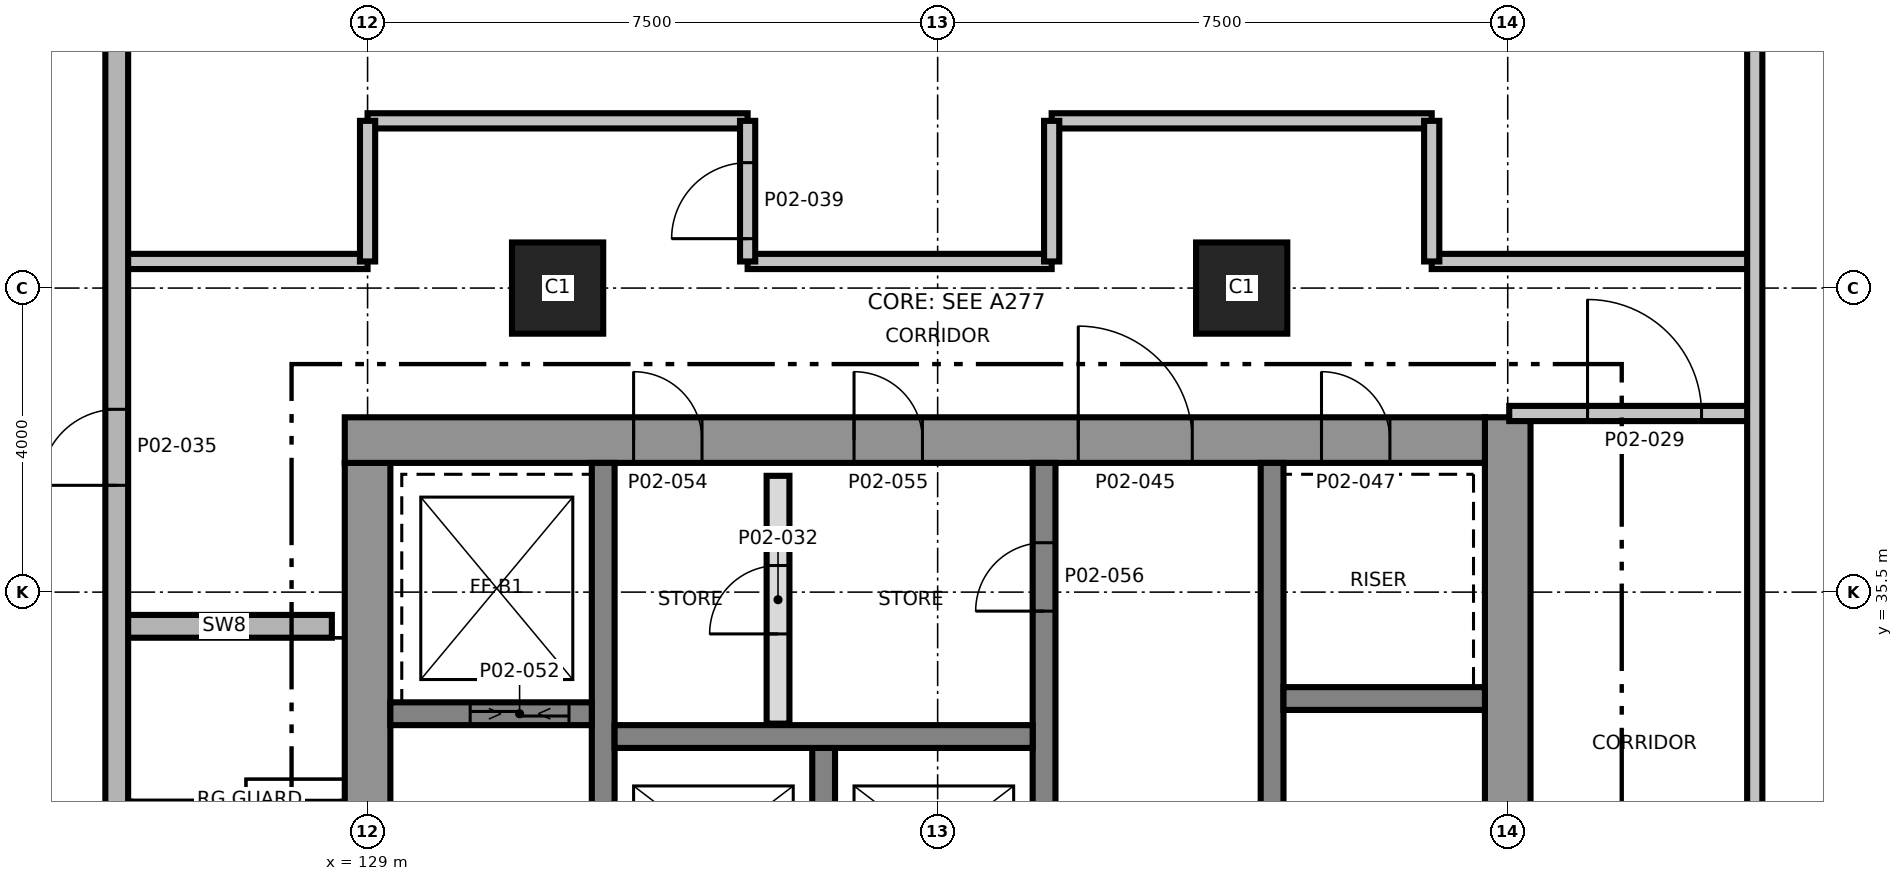
"""IFC4 building model, lengths in metres.
Left out: names, types, materials, properties, quantities, classifications, styles, units other than length and angle.
Written with IfcOpenShell. Run it as: python <this file> out.ifc"""

import sys

from ifc_helpers import new_model, si_unit, direction, frame, frame_2d, origin, origin_2d, place, context, subcontext, project, spatial, rectangle, extrude, element, fill, save


model = new_model("IFC4")
c1 = context("Model", 3, precision=1e-05, world=origin(), true_north=direction((0.0, 1.0)))
c2 = subcontext(c1, "Body", "Model", "MODEL_VIEW")
j1 = project(units=[si_unit("LENGTHUNIT", "METRE"), si_unit("PLANEANGLEUNIT", "RADIAN")], contexts=[c1])
p1 = place(None, origin())
s1 = spatial("IfcSite", under=j1, at=p1, CompositionType="ELEMENT")
p2 = place(p1, origin())
s2 = spatial("IfcBuilding", under=s1, at=p2, CompositionType="ELEMENT")
p3 = place(p2, frame((0.0, 0.0, 13.5)))
s3 = spatial("IfcBuildingStorey", under=s2, at=p3, CompositionType="ELEMENT", Elevation=13.5)
p4 = place(p3, frame((129.0, 24.8, 0.0), z_axis=(0.0, 0.0, 1.0), x_axis=(0.0, 1.0, 0.0)))
e1 = element("IfcWall", 1, at=p4, inside=s3, PredefinedType="SHEAR", context=c2, shape_type="SweptSolid", body=[
    extrude(rectangle(XDim=12.4, YDim=0.6, at=frame_2d((6.2, 0.0))), origin(), (0.0, 0.0, 1.0), 5.0),
])
p5 = place(p4, frame((5.15, 0.0, 0.0)))
e2 = element("IfcOpeningElement", 2, at=p5, cuts=e1, PredefinedType="OPENING", context=c2, shape_type="SweptSolid", body=[
    extrude(rectangle(XDim=1.0, YDim=2.1, at=frame_2d((0.5, 1.05))), frame((0.0, 0.31, 0.0), z_axis=(0.0, -1.0, 0.0), x_axis=(1.0, 0.0, 0.0)), (0.0, 0.0, 1.0), 0.62),
])
p6 = place(p3, frame((144.0, 24.2, 0.0), z_axis=(0.0, 0.0, 1.0), x_axis=(0.0, 1.0, 0.0)))
e3 = element("IfcWall", 3, at=p6, inside=s3, PredefinedType="SHEAR", context=c2, shape_type="SweptSolid", body=[
    extrude(rectangle(XDim=13.6, YDim=0.6, at=frame_2d((6.8, 0.0))), origin(), (0.0, 0.0, 1.0), 5.0),
])
p7 = place(p3, frame((128.7, 37.5, 0.0), z_axis=(0.0, 0.0, 1.0), x_axis=(1.0, 0.0, 0.0)))
e4 = element("IfcWall", 4, at=p7, inside=s3, PredefinedType="SHEAR", context=c2, shape_type="SweptSolid", body=[
    extrude(rectangle(XDim=15.0, YDim=0.6, at=frame_2d((7.5, 0.0))), origin(), (0.0, 0.0, 1.0), 5.0),
])
p8 = place(p7, frame((9.65, 0.0, 0.0)))
e5 = element("IfcOpeningElement", 5, at=p8, cuts=e4, PredefinedType="OPENING", context=c2, shape_type="SweptSolid", body=[
    extrude(rectangle(XDim=1.5, YDim=2.1, at=frame_2d((0.75, 1.05))), frame((0.0, 0.31, 0.0), z_axis=(0.0, -1.0, 0.0), x_axis=(1.0, 0.0, 0.0)), (0.0, 0.0, 1.0), 0.62),
])
p9 = place(p7, frame((12.85, 0.0, 0.0)))
e6 = element("IfcOpeningElement", 6, at=p9, cuts=e4, PredefinedType="OPENING", context=c2, shape_type="SweptSolid", body=[
    extrude(rectangle(XDim=0.9, YDim=2.1, at=frame_2d((0.45, 1.05))), frame((0.0, 0.31, 0.0), z_axis=(0.0, -1.0, 0.0), x_axis=(1.0, 0.0, 0.0)), (0.0, 0.0, 1.0), 0.62),
])
p10 = place(p7, frame((3.8, 0.0, 0.0)))
e7 = element("IfcOpeningElement", 7, at=p10, cuts=e4, PredefinedType="OPENING", context=c2, shape_type="SweptSolid", body=[
    extrude(rectangle(XDim=0.9, YDim=2.1, at=frame_2d((0.45, 1.05))), frame((0.0, 0.31, 0.0), z_axis=(0.0, -1.0, 0.0), x_axis=(1.0, 0.0, 0.0)), (0.0, 0.0, 1.0), 0.62),
])
p11 = place(p7, frame((6.7, 0.0, 0.0)))
e8 = element("IfcOpeningElement", 8, at=p11, cuts=e4, PredefinedType="OPENING", context=c2, shape_type="SweptSolid", body=[
    extrude(rectangle(XDim=0.9, YDim=2.1, at=frame_2d((0.45, 1.05))), frame((0.0, 0.31, 0.0), z_axis=(0.0, -1.0, 0.0), x_axis=(1.0, 0.0, 0.0)), (0.0, 0.0, 1.0), 0.62),
])
p12 = place(p3, frame((132.1, 24.8, 0.0), z_axis=(0.0, 0.0, 1.0), x_axis=(0.0, 1.0, 0.0)))
e9 = element("IfcWall", 9, at=p12, inside=s3, PredefinedType="SHEAR", context=c2, shape_type="SweptSolid", body=[
    extrude(rectangle(XDim=12.4, YDim=0.3, at=frame_2d((6.2, 0.0))), origin(), (0.0, 0.0, 1.0), 5.0),
])
p13 = place(p12, frame((3.9, 0.0, 0.0)))
e10 = element("IfcOpeningElement", 10, at=p13, cuts=e9, PredefinedType="OPENING", context=c2, shape_type="SweptSolid", body=[
    extrude(rectangle(XDim=1.2, YDim=2.1, at=frame_2d((0.6, 1.05))), frame((0.0, 0.16, 0.0), z_axis=(0.0, -1.0, 0.0), x_axis=(1.0, 0.0, 0.0)), (0.0, 0.0, 1.0), 0.32),
])
p14 = place(p3, frame((137.9, 24.8, 0.0), z_axis=(0.0, 0.0, 1.0), x_axis=(0.0, 1.0, 0.0)))
e11 = element("IfcWall", 11, at=p14, inside=s3, PredefinedType="SHEAR", context=c2, shape_type="SweptSolid", body=[
    extrude(rectangle(XDim=12.4, YDim=0.3, at=frame_2d((6.2, 0.0))), origin(), (0.0, 0.0, 1.0), 5.0),
])
p15 = place(p14, frame((3.95, 0.0, 0.0)))
e12 = element("IfcOpeningElement", 12, at=p15, cuts=e11, PredefinedType="OPENING", context=c2, shape_type="SweptSolid", body=[
    extrude(rectangle(XDim=1.5, YDim=2.1, at=frame_2d((0.75, 1.05))), frame((0.0, 0.16, 0.0), z_axis=(0.0, -1.0, 0.0), x_axis=(1.0, 0.0, 0.0)), (0.0, 0.0, 1.0), 0.32),
])
p16 = place(p14, frame((10.45, 0.0, 0.0)))
e13 = element("IfcOpeningElement", 13, at=p16, cuts=e11, PredefinedType="OPENING", context=c2, shape_type="SweptSolid", body=[
    extrude(rectangle(XDim=0.9, YDim=2.1, at=frame_2d((0.45, 1.05))), frame((0.0, 0.16, 0.0), z_axis=(0.0, -1.0, 0.0), x_axis=(1.0, 0.0, 0.0)), (0.0, 0.0, 1.0), 0.32),
])
p17 = place(p3, frame((140.9, 24.8, 0.0), z_axis=(0.0, 0.0, 1.0), x_axis=(0.0, 1.0, 0.0)))
e14 = element("IfcWall", 14, at=p17, inside=s3, PredefinedType="SHEAR", context=c2, shape_type="SweptSolid", body=[
    extrude(rectangle(XDim=12.4, YDim=0.3, at=frame_2d((6.2, 0.0))), origin(), (0.0, 0.0, 1.0), 5.0),
])
p18 = place(p17, frame((5.9, 0.0, 0.0)))
e15 = element("IfcOpeningElement", 15, at=p18, cuts=e14, PredefinedType="OPENING", context=c2, shape_type="SweptSolid", body=[
    extrude(rectangle(XDim=1.2, YDim=2.1, at=frame_2d((0.6, 1.05))), frame((0.0, 0.16, 0.0), z_axis=(0.0, -1.0, 0.0), x_axis=(1.0, 0.0, 0.0)), (0.0, 0.0, 1.0), 0.32),
])
p19 = place(p3, frame((135.0, 30.85, 0.0), z_axis=(0.0, 0.0, 1.0), x_axis=(0.0, 1.0, 0.0)))
e16 = element("IfcWall", 16, at=p19, inside=s3, PredefinedType="SHEAR", context=c2, shape_type="SweptSolid", body=[
    extrude(rectangle(XDim=2.6, YDim=0.3, at=frame_2d((1.3, 0.0))), origin(), (0.0, 0.0, 1.0), 5.0),
])
p20 = place(p3, frame((132.25, 33.6, 0.0), z_axis=(0.0, 0.0, 1.0), x_axis=(1.0, 0.0, 0.0)))
e17 = element("IfcWall", 17, at=p20, inside=s3, PredefinedType="SHEAR", context=c2, shape_type="SweptSolid", body=[
    extrude(rectangle(XDim=5.5, YDim=0.3, at=frame_2d((2.75, 0.0))), origin(), (0.0, 0.0, 1.0), 5.0),
])
p21 = place(p3, frame((129.3, 33.9, 0.0), z_axis=(0.0, 0.0, 1.0), x_axis=(1.0, 0.0, 0.0)))
e18 = element("IfcWall", 18, at=p21, inside=s3, PredefinedType="SHEAR", context=c2, shape_type="SweptSolid", body=[
    extrude(rectangle(XDim=2.65, YDim=0.3, at=frame_2d((1.325, 0.0))), origin(), (0.0, 0.0, 1.0), 5.0),
])
p22 = place(p21, frame((1.05, 0.0, 0.0)))
e19 = element("IfcOpeningElement", 19, at=p22, cuts=e18, PredefinedType="OPENING", context=c2, shape_type="SweptSolid", body=[
    extrude(rectangle(XDim=1.3, YDim=2.4, at=frame_2d((0.65, 1.2))), frame((0.0, 0.16, 0.0), z_axis=(0.0, -1.0, 0.0), x_axis=(1.0, 0.0, 0.0)), (0.0, 0.0, 1.0), 0.32),
])
p23 = place(p3, frame((141.05, 34.1, 0.0), z_axis=(0.0, 0.0, 1.0), x_axis=(1.0, 0.0, 0.0)))
e20 = element("IfcWall", 20, at=p23, inside=s3, PredefinedType="SHEAR", context=c2, shape_type="SweptSolid", body=[
    extrude(rectangle(XDim=2.65, YDim=0.3, at=frame_2d((1.325, 0.0))), origin(), (0.0, 0.0, 1.0), 5.0),
])
for number, where, z_axis, x_axis in (
    (21, (131.5, 39.5, 0.0), (0.0, 0.0, 1.0), (1.0, 0.0, 0.0)),
    (22, (140.5, 39.5, 0.0), (0.0, 0.0, 1.0), (1.0, 0.0, 0.0)),
):
    element("IfcColumn", number, at=place(p3, frame(where, z_axis=z_axis, x_axis=x_axis)), inside=s3, PredefinedType="COLUMN", context=c2, shape_type="SweptSolid", body=[
        extrude(rectangle(XDim=1.2, YDim=1.2, at=origin_2d()), origin(), (0.0, 0.0, 1.0), 5.0),
    ])
p24 = place(p3, frame((125.7, 35.05, 0.0), z_axis=(0.0, 0.0, 1.0), x_axis=(1.0, 0.0, 0.0)))
e23 = element("IfcWall", 23, at=p24, inside=s3, PredefinedType="SHEAR", context=c2, shape_type="SweptSolid", body=[
    extrude(rectangle(XDim=2.83, YDim=0.3, at=frame_2d((1.415, 0.0))), origin(), (0.0, 0.0, 1.0), 4.7),
])
p25 = place(p3, frame((144.02, 37.85, 0.0), z_axis=(0.0, 0.0, 1.0), x_axis=(1.0, 0.0, 0.0)))
e24 = element("IfcWall", 24, at=p25, inside=s3, PredefinedType="PARTITIONING", context=c2, shape_type="SweptSolid", body=[
    extrude(rectangle(XDim=3.23, YDim=0.2, at=frame_2d((1.615, 0.0))), origin(), (0.0, 0.0, 1.0), 4.7),
])
p26 = place(p25, frame((1.03, 0.0, 0.0)))
e25 = element("IfcOpeningElement", 25, at=p26, cuts=e24, PredefinedType="OPENING", context=c2, shape_type="SweptSolid", body=[
    extrude(rectangle(XDim=1.5, YDim=2.1, at=frame_2d((0.75, 1.05))), frame((0.0, 0.11, 0.0), z_axis=(0.0, -1.0, 0.0), x_axis=(1.0, 0.0, 0.0)), (0.0, 0.0, 1.0), 0.22),
])
p27 = place(p3, frame((125.75, 39.85, 0.0), z_axis=(0.0, 0.0, 1.0), x_axis=(1.0, 0.0, 0.0)))
e26 = element("IfcWall", 26, at=p27, inside=s3, PredefinedType="PARTITIONING", context=c2, shape_type="SweptSolid", body=[
    extrude(rectangle(XDim=3.25, YDim=0.2, at=frame_2d((1.625, 0.0))), origin(), (0.0, 0.0, 1.0), 4.7),
])
p28 = place(p3, frame((134.0, 39.85, 0.0), z_axis=(0.0, 0.0, 1.0), x_axis=(1.0, 0.0, 0.0)))
e27 = element("IfcWall", 27, at=p28, inside=s3, PredefinedType="PARTITIONING", context=c2, shape_type="SweptSolid", body=[
    extrude(rectangle(XDim=4.0, YDim=0.2, at=frame_2d((2.0, 0.0))), origin(), (0.0, 0.0, 1.0), 4.7),
])
p29 = place(p3, frame((143.0, 39.85, 0.0), z_axis=(0.0, 0.0, 1.0), x_axis=(1.0, 0.0, 0.0)))
e28 = element("IfcWall", 28, at=p29, inside=s3, PredefinedType="PARTITIONING", context=c2, shape_type="SweptSolid", body=[
    extrude(rectangle(XDim=4.25, YDim=0.2, at=frame_2d((2.125, 0.0))), origin(), (0.0, 0.0, 1.0), 4.7),
])
for number, where, z_axis, x_axis in (
    (29, (129.0, 41.7, 0.0), (0.0, 0.0, 1.0), (1.0, 0.0, 0.0)),
    (30, (138.0, 41.7, 0.0), (0.0, 0.0, 1.0), (1.0, 0.0, 0.0)),
):
    element("IfcWall", number, at=place(p3, frame(where, z_axis=z_axis, x_axis=x_axis)), inside=s3, PredefinedType="PARTITIONING", context=c2, shape_type="SweptSolid", body=[
        extrude(rectangle(XDim=5.0, YDim=0.2, at=frame_2d((2.5, 0.0))), origin(), (0.0, 0.0, 1.0), 4.7),
    ])
p30 = place(p3, frame((125.7, 11.07, 0.0), z_axis=(0.0, 0.0, 1.0), x_axis=(0.0, 1.0, 0.0)))
e31 = element("IfcWall", 31, at=p30, inside=s3, PredefinedType="SHEAR", context=c2, shape_type="SweptSolid", body=[
    extrude(rectangle(XDim=38.86, YDim=0.3, at=frame_2d((19.43, 0.0))), origin(), (0.0, 0.0, 1.0), 4.7),
])
p31 = place(p30, frame((14.226, 0.0, 0.0)))
e32 = element("IfcOpeningElement", 32, at=p31, cuts=e31, PredefinedType="OPENING", context=c2, shape_type="SweptSolid", body=[
    extrude(rectangle(XDim=1.0, YDim=2.1, at=frame_2d((0.5, 1.05))), frame((0.0, 0.16, 0.0), z_axis=(0.0, -1.0, 0.0), x_axis=(1.0, 0.0, 0.0)), (0.0, 0.0, 1.0), 0.32),
])
p32 = place(p30, frame((25.835, 0.0, 0.0)))
e33 = element("IfcOpeningElement", 33, at=p32, cuts=e31, PredefinedType="OPENING", context=c2, shape_type="SweptSolid", body=[
    extrude(rectangle(XDim=1.0, YDim=2.1, at=frame_2d((0.5, 1.05))), frame((0.0, 0.16, 0.0), z_axis=(0.0, -1.0, 0.0), x_axis=(1.0, 0.0, 0.0)), (0.0, 0.0, 1.0), 0.32),
])
p33 = place(p3, frame((129.0, 39.85, 0.0), z_axis=(0.0, 0.0, 1.0), x_axis=(0.0, 1.0, 0.0)))
e34 = element("IfcWall", 34, at=p33, inside=s3, PredefinedType="PARTITIONING", context=c2, shape_type="SweptSolid", body=[
    extrude(rectangle(XDim=1.85, YDim=0.2, at=frame_2d((0.925, 0.0))), origin(), (0.0, 0.0, 1.0), 4.7),
])
p34 = place(p3, frame((134.0, 39.85, 0.0), z_axis=(0.0, 0.0, 1.0), x_axis=(0.0, 1.0, 0.0)))
e35 = element("IfcWall", 35, at=p34, inside=s3, PredefinedType="PARTITIONING", context=c2, shape_type="SweptSolid", body=[
    extrude(rectangle(XDim=1.85, YDim=0.2, at=frame_2d((0.925, 0.0))), origin(), (0.0, 0.0, 1.0), 4.7),
])
p35 = place(p34, frame((0.3, 0.0, 0.0)))
e36 = element("IfcOpeningElement", 36, at=p35, cuts=e35, PredefinedType="OPENING", context=c2, shape_type="SweptSolid", body=[
    extrude(rectangle(XDim=1.0, YDim=2.1, at=frame_2d((0.5, 1.05))), frame((0.0, 0.11, 0.0), z_axis=(0.0, -1.0, 0.0), x_axis=(1.0, 0.0, 0.0)), (0.0, 0.0, 1.0), 0.22),
])
p36 = place(p3, frame((134.4, 33.77, 0.0), z_axis=(0.0, 0.0, 1.0), x_axis=(0.0, 1.0, 0.0)))
e37 = element("IfcWall", 37, at=p36, inside=s3, PredefinedType="PARTITIONING", context=c2, shape_type="SweptSolid", body=[
    extrude(rectangle(XDim=3.26, YDim=0.3, at=frame_2d((1.63, 0.0))), origin(), (0.0, 0.0, 1.0), 4.7),
])
p37 = place(p36, frame((1.18, 0.0, 0.0)))
e38 = element("IfcOpeningElement", 38, at=p37, cuts=e37, PredefinedType="OPENING", context=c2, shape_type="SweptSolid", body=[
    extrude(rectangle(XDim=0.9, YDim=2.1, at=frame_2d((0.45, 1.05))), frame((0.0, 0.16, 0.0), z_axis=(0.0, -1.0, 0.0), x_axis=(1.0, 0.0, 0.0)), (0.0, 0.0, 1.0), 0.32),
])
for number, where, z_axis, x_axis in (
    (39, (138.0, 39.85, 0.0), (0.0, 0.0, 1.0), (0.0, 1.0, 0.0)),
    (40, (143.0, 39.85, 0.0), (0.0, 0.0, 1.0), (0.0, 1.0, 0.0)),
):
    element("IfcWall", number, at=place(p3, frame(where, z_axis=z_axis, x_axis=x_axis)), inside=s3, PredefinedType="PARTITIONING", context=c2, shape_type="SweptSolid", body=[
        extrude(rectangle(XDim=1.85, YDim=0.2, at=frame_2d((0.925, 0.0))), origin(), (0.0, 0.0, 1.0), 4.7),
    ])
p38 = place(p3, frame((147.25, 11.07, 0.0), z_axis=(0.0, 0.0, 1.0), x_axis=(0.0, 1.0, 0.0)))
e41 = element("IfcWall", 41, at=p38, inside=s3, PredefinedType="PARTITIONING", context=c2, shape_type="SweptSolid", body=[
    extrude(rectangle(XDim=38.86, YDim=0.2, at=frame_2d((19.43, 0.0))), origin(), (0.0, 0.0, 1.0), 4.7),
])
p39 = place(p38, frame((18.18, 0.0, 0.0)))
e42 = element("IfcOpeningElement", 42, at=p39, cuts=e41, PredefinedType="OPENING", context=c2, shape_type="SweptSolid", body=[
    extrude(rectangle(XDim=1.5, YDim=2.1, at=frame_2d((0.75, 1.05))), frame((0.0, 0.11, 0.0), z_axis=(0.0, -1.0, 0.0), x_axis=(1.0, 0.0, 0.0)), (0.0, 0.0, 1.0), 0.22),
])
p40 = place(p38, frame((5.03, 0.0, 0.0)))
e43 = element("IfcOpeningElement", 43, at=p40, cuts=e41, PredefinedType="OPENING", context=c2, shape_type="SweptSolid", body=[
    extrude(rectangle(XDim=1.0, YDim=2.1, at=frame_2d((0.5, 1.05))), frame((0.0, 0.11, 0.0), z_axis=(0.0, -1.0, 0.0), x_axis=(1.0, 0.0, 0.0)), (0.0, 0.0, 1.0), 0.22),
])
p41 = place(p26, origin())
e44 = element("IfcDoor", 44, at=p41, inside=s3, OperationType="SINGLE_SWING_LEFT", PredefinedType="DOOR", context=c2, shape_type="SweptSolid", body=[
    extrude(rectangle(XDim=1.5, YDim=2.1, at=frame_2d((0.75, 1.05))), frame((0.0, 0.025, 0.0), z_axis=(0.0, -1.0, 0.0), x_axis=(1.0, 0.0, 0.0)), (0.0, 0.0, 1.0), 0.05),
])
fill(e25, e44)
p42 = place(p37, origin())
e45 = element("IfcDoor", 45, at=p42, inside=s3, OperationType="SINGLE_SWING_RIGHT", PredefinedType="DOOR", context=c2, shape_type="SweptSolid", body=[
    extrude(rectangle(XDim=0.9, YDim=2.1, at=frame_2d((0.45, 1.05))), frame((0.0, 0.025, 0.0), z_axis=(0.0, -1.0, 0.0), x_axis=(1.0, 0.0, 0.0)), (0.0, 0.0, 1.0), 0.05),
])
fill(e38, e45)
p43 = place(p32, origin())
e46 = element("IfcDoor", 46, at=p43, inside=s3, OperationType="SINGLE_SWING_LEFT", PredefinedType="DOOR", context=c2, shape_type="SweptSolid", body=[
    extrude(rectangle(XDim=1.0, YDim=2.1, at=frame_2d((0.5, 1.05))), frame((0.0, 0.025, 0.0), z_axis=(0.0, -1.0, 0.0), x_axis=(1.0, 0.0, 0.0)), (0.0, 0.0, 1.0), 0.05),
])
fill(e33, e46)
p44 = place(p35, origin())
e47 = element("IfcDoor", 47, at=p44, inside=s3, OperationType="SINGLE_SWING_LEFT", PredefinedType="DOOR", context=c2, shape_type="SweptSolid", body=[
    extrude(rectangle(XDim=1.0, YDim=2.1, at=frame_2d((0.5, 1.05))), frame((0.0, 0.025, 0.0), z_axis=(0.0, -1.0, 0.0), x_axis=(1.0, 0.0, 0.0)), (0.0, 0.0, 1.0), 0.05),
])
fill(e36, e47)
p45 = place(p8, origin())
e48 = element("IfcDoor", 48, at=p45, inside=s3, OperationType="SINGLE_SWING_RIGHT", PredefinedType="DOOR", context=c2, shape_type="SweptSolid", body=[
    extrude(rectangle(XDim=1.5, YDim=2.1, at=frame_2d((0.75, 1.05))), frame((0.0, 0.025, 0.0), z_axis=(0.0, -1.0, 0.0), x_axis=(1.0, 0.0, 0.0)), (0.0, 0.0, 1.0), 0.05),
])
fill(e5, e48)
p46 = place(p9, origin())
e49 = element("IfcDoor", 49, at=p46, inside=s3, OperationType="SINGLE_SWING_RIGHT", PredefinedType="DOOR", context=c2, shape_type="SweptSolid", body=[
    extrude(rectangle(XDim=0.9, YDim=2.1, at=frame_2d((0.45, 1.05))), frame((0.0, 0.025, 0.0), z_axis=(0.0, -1.0, 0.0), x_axis=(1.0, 0.0, 0.0)), (0.0, 0.0, 1.0), 0.05),
])
fill(e6, e49)
p47 = place(p22, origin())
e50 = element("IfcDoor", 50, at=p47, inside=s3, OperationType="SLIDING_TO_LEFT", PredefinedType="DOOR", context=c2, shape_type="SweptSolid", body=[
    extrude(rectangle(XDim=1.3, YDim=2.4, at=frame_2d((0.65, 1.2))), frame((0.0, 0.025, 0.0), z_axis=(0.0, -1.0, 0.0), x_axis=(1.0, 0.0, 0.0)), (0.0, 0.0, 1.0), 0.05),
])
fill(e19, e50)
p48 = place(p10, origin())
e51 = element("IfcDoor", 51, at=p48, inside=s3, OperationType="SINGLE_SWING_LEFT", PredefinedType="DOOR", context=c2, shape_type="SweptSolid", body=[
    extrude(rectangle(XDim=0.9, YDim=2.1, at=frame_2d((0.45, 1.05))), frame((0.0, 0.025, 0.0), z_axis=(0.0, -1.0, 0.0), x_axis=(1.0, 0.0, 0.0)), (0.0, 0.0, 1.0), 0.05),
])
fill(e7, e51)
p49 = place(p11, origin())
e52 = element("IfcDoor", 52, at=p49, inside=s3, OperationType="SINGLE_SWING_RIGHT", PredefinedType="DOOR", context=c2, shape_type="SweptSolid", body=[
    extrude(rectangle(XDim=0.9, YDim=2.1, at=frame_2d((0.45, 1.05))), frame((0.0, 0.025, 0.0), z_axis=(0.0, -1.0, 0.0), x_axis=(1.0, 0.0, 0.0)), (0.0, 0.0, 1.0), 0.05),
])
fill(e8, e52)
p50 = place(p16, origin())
e53 = element("IfcDoor", 53, at=p50, inside=s3, OperationType="SINGLE_SWING_RIGHT", PredefinedType="DOOR", context=c2, shape_type="SweptSolid", body=[
    extrude(rectangle(XDim=0.9, YDim=2.1, at=frame_2d((0.45, 1.05))), frame((0.0, 0.025, 0.0), z_axis=(0.0, -1.0, 0.0), x_axis=(1.0, 0.0, 0.0)), (0.0, 0.0, 1.0), 0.05),
])
fill(e13, e53)
save(model, sys.argv[1])
